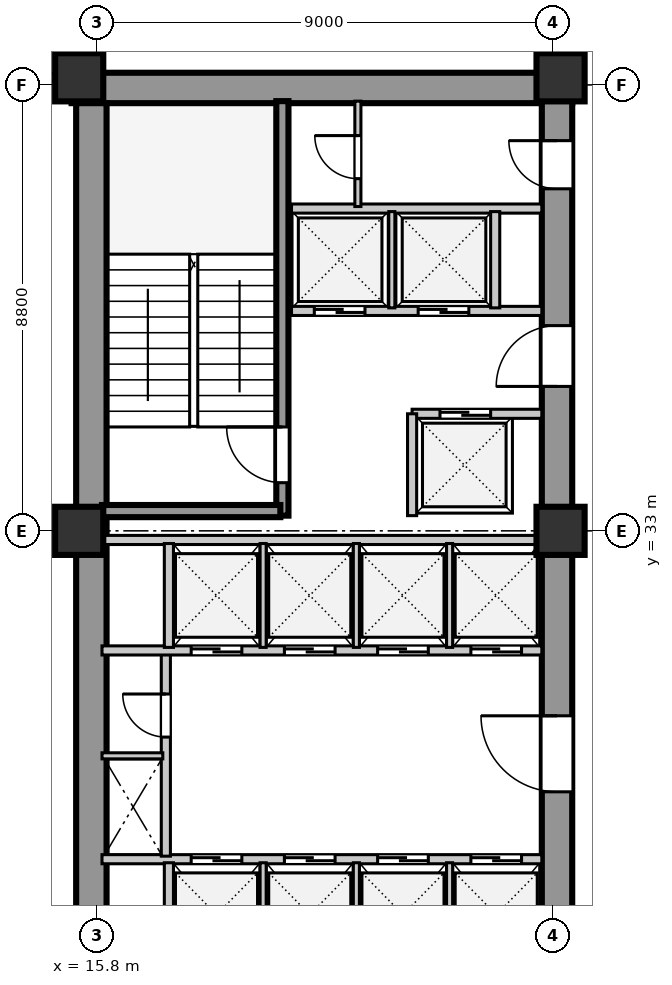
"""IFC4 building model, lengths in metres.
Left out: names, types, materials, properties, quantities, classifications, styles, units other than length and angle.
Written with IfcOpenShell. Run it as: python <this file> out.ifc"""

import sys

from ifc_helpers import new_model, si_unit, direction, frame, frame_2d, origin, origin_2d, place, context, subcontext, project, spatial, rectangle, extrude, element, fill, save


model = new_model("IFC4")
c1 = context("Model", 3, precision=1e-05, world=origin(), true_north=direction((0.0, 1.0)))
c2 = subcontext(c1, "Body", "Model", "MODEL_VIEW")
j1 = project(units=[si_unit("LENGTHUNIT", "METRE"), si_unit("PLANEANGLEUNIT", "RADIAN")], contexts=[c1])
p1 = place(None, origin())
s1 = spatial("IfcSite", under=j1, at=p1, CompositionType="ELEMENT")
p2 = place(p1, origin())
s2 = spatial("IfcBuilding", under=s1, at=p2, CompositionType="ELEMENT")
p3 = place(p2, frame((0.0, 0.0, 12.5)))
s3 = spatial("IfcBuildingStorey", under=s2, at=p3, CompositionType="ELEMENT", Elevation=12.5)
p4 = place(p3, frame((15.3, 41.74, 0.0), z_axis=(0.0, 0.0, 1.0), x_axis=(1.0, 0.0, 0.0)))
e1 = element("IfcWall", 1, at=p4, inside=s3, PredefinedType="SHEAR", context=c2, shape_type="SweptSolid", body=[
    extrude(rectangle(XDim=9.88, YDim=0.6, at=frame_2d((4.94, 0.0))), origin(), (0.0, 0.0, 1.0), 4.22),
])
p5 = place(p3, frame((15.69, 15.81, 0.0), z_axis=(0.0, 0.0, 1.0), x_axis=(0.0, 1.0, 0.0)))
e2 = element("IfcWall", 2, at=p5, inside=s3, PredefinedType="SHEAR", context=c2, shape_type="SweptSolid", body=[
    extrude(rectangle(XDim=25.63, YDim=0.6, at=frame_2d((12.815, 0.0))), origin(), (0.0, 0.0, 1.0), 4.22),
])
p6 = place(p3, frame((24.88, 15.74, 0.0), z_axis=(0.0, 0.0, 1.0), x_axis=(0.0, 1.0, 0.0)))
e3 = element("IfcWall", 3, at=p6, inside=s3, PredefinedType="SHEAR", context=c2, shape_type="SweptSolid", body=[
    extrude(rectangle(XDim=25.76, YDim=0.6, at=frame_2d((12.88, 0.0))), origin(), (0.0, 0.0, 1.0), 4.22),
])
p7 = place(p6, frame((1.61, 0.0, 0.0)))
e4 = element("IfcOpeningElement", 4, at=p7, cuts=e3, PredefinedType="OPENING", context=c2, shape_type="SweptSolid", body=[
    extrude(rectangle(XDim=1.2, YDim=2.1, at=frame_2d((0.6, 1.05))), frame((0.0, 0.31, 0.0), z_axis=(0.0, -1.0, 0.0), x_axis=(1.0, 0.0, 0.0)), (0.0, 0.0, 1.0), 0.62),
])
p8 = place(p6, frame((6.78, 0.0, 0.0)))
e5 = element("IfcOpeningElement", 5, at=p8, cuts=e3, PredefinedType="OPENING", context=c2, shape_type="SweptSolid", body=[
    extrude(rectangle(XDim=0.85, YDim=2.06, at=frame_2d((0.425, 1.03))), frame((0.0, 0.31, 0.0), z_axis=(0.0, -1.0, 0.0), x_axis=(1.0, 0.0, 0.0)), (0.0, 0.0, 1.0), 0.62),
])
p9 = place(p6, frame((12.11, 0.0, 0.0)))
e6 = element("IfcOpeningElement", 6, at=p9, cuts=e3, PredefinedType="OPENING", context=c2, shape_type="SweptSolid", body=[
    extrude(rectangle(XDim=1.5, YDim=2.12, at=frame_2d((0.75, 1.06))), frame((0.0, 0.31, 0.0), z_axis=(0.0, -1.0, 0.0), x_axis=(1.0, 0.0, 0.0)), (0.0, 0.0, 1.0), 0.62),
])
p10 = place(p6, frame((20.11, 0.0, 0.0)))
e7 = element("IfcOpeningElement", 7, at=p10, cuts=e3, PredefinedType="OPENING", context=c2, shape_type="SweptSolid", body=[
    extrude(rectangle(XDim=1.2, YDim=2.12, at=frame_2d((0.6, 1.06))), frame((0.0, 0.31, 0.0), z_axis=(0.0, -1.0, 0.0), x_axis=(1.0, 0.0, 0.0)), (0.0, 0.0, 1.0), 0.62),
])
p11 = place(p6, frame((24.01, 0.0, 0.0)))
e8 = element("IfcOpeningElement", 8, at=p11, cuts=e3, PredefinedType="OPENING", context=c2, shape_type="SweptSolid", body=[
    extrude(rectangle(XDim=0.95, YDim=2.1, at=frame_2d((0.475, 1.05))), frame((0.0, 0.31, 0.0), z_axis=(0.0, -1.0, 0.0), x_axis=(1.0, 0.0, 0.0)), (0.0, 0.0, 1.0), 0.62),
])
for number, where, z_axis, x_axis in (
    (9, (15.45, 33.0, 0.0), (0.0, 0.0, 1.0), (1.0, 0.0, 0.0)),
    (10, (15.45, 41.95, 0.0), (0.0, 0.0, 1.0), (1.0, 0.0, 0.0)),
    (11, (24.95, 33.0, 0.0), (0.0, 0.0, 1.0), (1.0, 0.0, 0.0)),
    (12, (24.95, 41.95, 0.0), (0.0, 0.0, 1.0), (1.0, 0.0, 0.0)),
):
    element("IfcColumn", number, at=place(p3, frame(where, z_axis=z_axis, x_axis=x_axis)), inside=s3, PredefinedType="COLUMN", context=c2, shape_type="SweptSolid", body=[
        extrude(rectangle(XDim=0.95, YDim=0.95, at=origin_2d()), origin(), (0.0, 0.0, 1.0), 4.22),
    ])
p12 = place(p3, frame((15.9, 26.52, 0.0), z_axis=(0.0, 0.0, 1.0), x_axis=(1.0, 0.0, 0.0)))
e13 = element("IfcWall", 13, at=p12, inside=s3, PredefinedType="SOLIDWALL", context=c2, shape_type="SweptSolid", body=[
    extrude(rectangle(XDim=8.68, YDim=0.18, at=frame_2d((4.34, 0.0))), origin(), (0.0, 0.0, 1.0), 4.22),
])
p13 = place(p12, frame((1.76, 0.0, 0.0)))
e14 = element("IfcOpeningElement", 14, at=p13, cuts=e13, PredefinedType="OPENING", context=c2, shape_type="SweptSolid", body=[
    extrude(rectangle(XDim=1.0, YDim=2.1, at=frame_2d((0.5, 1.05))), frame((0.0, 0.1, 0.0), z_axis=(0.0, -1.0, 0.0), x_axis=(1.0, 0.0, 0.0)), (0.0, 0.0, 1.0), 0.2),
])
p14 = place(p12, frame((3.6, 0.0, 0.0)))
e15 = element("IfcOpeningElement", 15, at=p14, cuts=e13, PredefinedType="OPENING", context=c2, shape_type="SweptSolid", body=[
    extrude(rectangle(XDim=1.0, YDim=2.1, at=frame_2d((0.5, 1.05))), frame((0.0, 0.1, 0.0), z_axis=(0.0, -1.0, 0.0), x_axis=(1.0, 0.0, 0.0)), (0.0, 0.0, 1.0), 0.2),
])
p15 = place(p12, frame((5.44, 0.0, 0.0)))
e16 = element("IfcOpeningElement", 16, at=p15, cuts=e13, PredefinedType="OPENING", context=c2, shape_type="SweptSolid", body=[
    extrude(rectangle(XDim=1.0, YDim=2.1, at=frame_2d((0.5, 1.05))), frame((0.0, 0.1, 0.0), z_axis=(0.0, -1.0, 0.0), x_axis=(1.0, 0.0, 0.0)), (0.0, 0.0, 1.0), 0.2),
])
p16 = place(p12, frame((7.28, 0.0, 0.0)))
e17 = element("IfcOpeningElement", 17, at=p16, cuts=e13, PredefinedType="OPENING", context=c2, shape_type="SweptSolid", body=[
    extrude(rectangle(XDim=1.0, YDim=2.1, at=frame_2d((0.5, 1.05))), frame((0.0, 0.1, 0.0), z_axis=(0.0, -1.0, 0.0), x_axis=(1.0, 0.0, 0.0)), (0.0, 0.0, 1.0), 0.2),
])
p17 = place(p3, frame((17.22, 24.4, 0.0), z_axis=(0.0, 0.0, 1.0), x_axis=(0.0, 1.0, 0.0)))
e18 = element("IfcWall", 18, at=p17, inside=s3, PredefinedType="SOLIDWALL", context=c2, shape_type="SweptSolid", body=[
    extrude(rectangle(XDim=2.05, YDim=0.18, at=frame_2d((1.025, 0.0))), origin(), (0.0, 0.0, 1.0), 4.22),
])
for number, where, z_axis, x_axis in (
    (19, (19.08, 24.4, 0.0), (0.0, 0.0, 1.0), (0.0, 1.0, 0.0)),
    (20, (20.92, 24.4, 0.0), (0.0, 0.0, 1.0), (0.0, 1.0, 0.0)),
    (21, (22.76, 24.4, 0.0), (0.0, 0.0, 1.0), (0.0, 1.0, 0.0)),
):
    element("IfcWall", number, at=place(p3, frame(where, z_axis=z_axis, x_axis=x_axis)), inside=s3, PredefinedType="PARTITIONING", context=c2, shape_type="SweptSolid", body=[
        extrude(rectangle(XDim=2.05, YDim=0.12, at=frame_2d((1.025, 0.0))), origin(), (0.0, 0.0, 1.0), 4.22),
    ])
p18 = place(p3, frame((17.16, 26.58, 0.0), z_axis=(0.0, 0.0, 1.0), x_axis=(0.0, 1.0, 0.0)))
e22 = element("IfcWall", 22, at=p18, inside=s3, PredefinedType="SOLIDWALL", context=c2, shape_type="SweptSolid", body=[
    extrude(rectangle(XDim=4.02, YDim=0.18, at=frame_2d((2.01, 0.0))), origin(), (0.0, 0.0, 1.0), 4.22),
])
p19 = place(p18, frame((2.35, 0.0, 0.0)))
e23 = element("IfcOpeningElement", 23, at=p19, cuts=e22, PredefinedType="OPENING", context=c2, shape_type="SweptSolid", body=[
    extrude(rectangle(XDim=0.85, YDim=2.06, at=frame_2d((0.425, 1.03))), frame((0.0, 0.1, 0.0), z_axis=(0.0, -1.0, 0.0), x_axis=(1.0, 0.0, 0.0)), (0.0, 0.0, 1.0), 0.2),
])
p20 = place(p3, frame((15.9, 28.56, 0.0), z_axis=(0.0, 0.0, 1.0), x_axis=(1.0, 0.0, 0.0)))
e24 = element("IfcWall", 24, at=p20, inside=s3, PredefinedType="PARTITIONING", context=c2, shape_type="SweptSolid", body=[
    extrude(rectangle(XDim=1.2, YDim=0.12, at=frame_2d((0.6, 0.0))), origin(), (0.0, 0.0, 1.0), 4.22),
])
p21 = place(p3, frame((15.9, 30.64, 0.0), z_axis=(0.0, 0.0, 1.0), x_axis=(1.0, 0.0, 0.0)))
e25 = element("IfcWall", 25, at=p21, inside=s3, PredefinedType="SOLIDWALL", context=c2, shape_type="SweptSolid", body=[
    extrude(rectangle(XDim=8.68, YDim=0.18, at=frame_2d((4.34, 0.0))), origin(), (0.0, 0.0, 1.0), 4.22),
])
p22 = place(p21, frame((1.76, 0.0, 0.0)))
e26 = element("IfcOpeningElement", 26, at=p22, cuts=e25, PredefinedType="OPENING", context=c2, shape_type="SweptSolid", body=[
    extrude(rectangle(XDim=1.0, YDim=2.1, at=frame_2d((0.5, 1.05))), frame((0.0, 0.1, 0.0), z_axis=(0.0, -1.0, 0.0), x_axis=(1.0, 0.0, 0.0)), (0.0, 0.0, 1.0), 0.2),
])
p23 = place(p21, frame((3.6, 0.0, 0.0)))
e27 = element("IfcOpeningElement", 27, at=p23, cuts=e25, PredefinedType="OPENING", context=c2, shape_type="SweptSolid", body=[
    extrude(rectangle(XDim=1.0, YDim=2.1, at=frame_2d((0.5, 1.05))), frame((0.0, 0.1, 0.0), z_axis=(0.0, -1.0, 0.0), x_axis=(1.0, 0.0, 0.0)), (0.0, 0.0, 1.0), 0.2),
])
p24 = place(p21, frame((5.44, 0.0, 0.0)))
e28 = element("IfcOpeningElement", 28, at=p24, cuts=e25, PredefinedType="OPENING", context=c2, shape_type="SweptSolid", body=[
    extrude(rectangle(XDim=1.0, YDim=2.1, at=frame_2d((0.5, 1.05))), frame((0.0, 0.1, 0.0), z_axis=(0.0, -1.0, 0.0), x_axis=(1.0, 0.0, 0.0)), (0.0, 0.0, 1.0), 0.2),
])
p25 = place(p21, frame((7.28, 0.0, 0.0)))
e29 = element("IfcOpeningElement", 29, at=p25, cuts=e25, PredefinedType="OPENING", context=c2, shape_type="SweptSolid", body=[
    extrude(rectangle(XDim=1.0, YDim=2.1, at=frame_2d((0.5, 1.05))), frame((0.0, 0.1, 0.0), z_axis=(0.0, -1.0, 0.0), x_axis=(1.0, 0.0, 0.0)), (0.0, 0.0, 1.0), 0.2),
])
p26 = place(p3, frame((15.9, 32.82, 0.0), z_axis=(0.0, 0.0, 1.0), x_axis=(1.0, 0.0, 0.0)))
e30 = element("IfcWall", 30, at=p26, inside=s3, PredefinedType="SOLIDWALL", context=c2, shape_type="SweptSolid", body=[
    extrude(rectangle(XDim=8.68, YDim=0.18, at=frame_2d((4.34, 0.0))), origin(), (0.0, 0.0, 1.0), 3.42),
])
p27 = place(p3, frame((17.22, 30.7, 0.0), z_axis=(0.0, 0.0, 1.0), x_axis=(0.0, 1.0, 0.0)))
e31 = element("IfcWall", 31, at=p27, inside=s3, PredefinedType="SOLIDWALL", context=c2, shape_type="SweptSolid", body=[
    extrude(rectangle(XDim=2.05, YDim=0.18, at=frame_2d((1.025, 0.0))), origin(), (0.0, 0.0, 1.0), 4.22),
])
for number, where, z_axis, x_axis in (
    (32, (19.08, 30.7, 0.0), (0.0, 0.0, 1.0), (0.0, 1.0, 0.0)),
    (33, (20.92, 30.7, 0.0), (0.0, 0.0, 1.0), (0.0, 1.0, 0.0)),
    (34, (22.76, 30.7, 0.0), (0.0, 0.0, 1.0), (0.0, 1.0, 0.0)),
):
    element("IfcWall", number, at=place(p3, frame(where, z_axis=z_axis, x_axis=x_axis)), inside=s3, PredefinedType="PARTITIONING", context=c2, shape_type="SweptSolid", body=[
        extrude(rectangle(XDim=2.05, YDim=0.12, at=frame_2d((1.025, 0.0))), origin(), (0.0, 0.0, 1.0), 4.22),
    ])
p28 = place(p3, frame((19.46, 33.3, 0.0), z_axis=(0.0, 0.0, 1.0), x_axis=(0.0, 1.0, 0.0)))
e35 = element("IfcWall", 35, at=p28, inside=s3, PredefinedType="SHEAR", context=c2, shape_type="SweptSolid", body=[
    extrude(rectangle(XDim=8.18, YDim=0.24, at=frame_2d((4.09, 0.0))), origin(), (0.0, 0.0, 1.0), 4.5),
])
p29 = place(p28, frame((0.65, 0.0, 0.0)))
e36 = element("IfcOpeningElement", 36, at=p29, cuts=e35, PredefinedType="OPENING", context=c2, shape_type="SweptSolid", body=[
    extrude(rectangle(XDim=1.1, YDim=2.1, at=frame_2d((0.55, 1.05))), frame((0.0, 0.13, 0.0), z_axis=(0.0, -1.0, 0.0), x_axis=(1.0, 0.0, 0.0)), (0.0, 0.0, 1.0), 0.26),
])
p30 = place(p3, frame((15.9, 33.39, 0.0), z_axis=(0.0, 0.0, 1.0), x_axis=(1.0, 0.0, 0.0)))
e37 = element("IfcWall", 37, at=p30, inside=s3, PredefinedType="SHEAR", context=c2, shape_type="SweptSolid", body=[
    extrude(rectangle(XDim=3.52, YDim=0.24, at=frame_2d((1.76, 0.0))), origin(), (0.0, 0.0, 1.0), 4.5),
])
p31 = place(p3, frame((22.02, 35.31, 0.0), z_axis=(0.0, 0.0, 1.0), x_axis=(1.0, 0.0, 0.0)))
e38 = element("IfcWall", 38, at=p31, inside=s3, PredefinedType="SOLIDWALL", context=c2, shape_type="SweptSolid", body=[
    extrude(rectangle(XDim=2.56, YDim=0.18, at=frame_2d((1.28, 0.0))), origin(), (0.0, 0.0, 1.0), 4.22),
])
p32 = place(p31, frame((0.55, 0.0, 0.0)))
e39 = element("IfcOpeningElement", 39, at=p32, cuts=e38, PredefinedType="OPENING", context=c2, shape_type="SweptSolid", body=[
    extrude(rectangle(XDim=1.0, YDim=2.1, at=frame_2d((0.5, 1.05))), frame((0.0, 0.1, 0.0), z_axis=(0.0, -1.0, 0.0), x_axis=(1.0, 0.0, 0.0)), (0.0, 0.0, 1.0), 0.2),
])
p33 = place(p3, frame((22.02, 33.3, 0.0), z_axis=(0.0, 0.0, 1.0), x_axis=(0.0, 1.0, 0.0)))
e40 = element("IfcWall", 40, at=p33, inside=s3, PredefinedType="SOLIDWALL", context=c2, shape_type="SweptSolid", body=[
    extrude(rectangle(XDim=2.01, YDim=0.18, at=frame_2d((1.005, 0.0))), origin(), (0.0, 0.0, 1.0), 4.22),
])
p34 = place(p3, frame((19.64, 37.34, 0.0), z_axis=(0.0, 0.0, 1.0), x_axis=(1.0, 0.0, 0.0)))
e41 = element("IfcWall", 41, at=p34, inside=s3, PredefinedType="SOLIDWALL", context=c2, shape_type="SweptSolid", body=[
    extrude(rectangle(XDim=4.94, YDim=0.18, at=frame_2d((2.47, 0.0))), origin(), (0.0, 0.0, 1.0), 4.22),
])
p35 = place(p34, frame((0.45, 0.0, 0.0)))
e42 = element("IfcOpeningElement", 42, at=p35, cuts=e41, PredefinedType="OPENING", context=c2, shape_type="SweptSolid", body=[
    extrude(rectangle(XDim=1.0, YDim=2.1, at=frame_2d((0.5, 1.05))), frame((0.0, 0.1, 0.0), z_axis=(0.0, -1.0, 0.0), x_axis=(1.0, 0.0, 0.0)), (0.0, 0.0, 1.0), 0.2),
])
p36 = place(p34, frame((2.5, 0.0, 0.0)))
e43 = element("IfcOpeningElement", 43, at=p36, cuts=e41, PredefinedType="OPENING", context=c2, shape_type="SweptSolid", body=[
    extrude(rectangle(XDim=1.0, YDim=2.1, at=frame_2d((0.5, 1.05))), frame((0.0, 0.1, 0.0), z_axis=(0.0, -1.0, 0.0), x_axis=(1.0, 0.0, 0.0)), (0.0, 0.0, 1.0), 0.2),
])
p37 = place(p3, frame((19.64, 39.36, 0.0), z_axis=(0.0, 0.0, 1.0), x_axis=(1.0, 0.0, 0.0)))
e44 = element("IfcWall", 44, at=p37, inside=s3, PredefinedType="SOLIDWALL", context=c2, shape_type="SweptSolid", body=[
    extrude(rectangle(XDim=4.94, YDim=0.18, at=frame_2d((2.47, 0.0))), origin(), (0.0, 0.0, 1.0), 4.22),
])
p38 = place(p3, frame((21.62, 37.4, 0.0), z_axis=(0.0, 0.0, 1.0), x_axis=(0.0, 1.0, 0.0)))
e45 = element("IfcWall", 45, at=p38, inside=s3, PredefinedType="PARTITIONING", context=c2, shape_type="SweptSolid", body=[
    extrude(rectangle(XDim=1.9, YDim=0.12, at=frame_2d((0.95, 0.0))), origin(), (0.0, 0.0, 1.0), 4.22),
])
p39 = place(p3, frame((23.66, 37.4, 0.0), z_axis=(0.0, 0.0, 1.0), x_axis=(0.0, 1.0, 0.0)))
e46 = element("IfcWall", 46, at=p39, inside=s3, PredefinedType="SOLIDWALL", context=c2, shape_type="SweptSolid", body=[
    extrude(rectangle(XDim=1.9, YDim=0.18, at=frame_2d((0.95, 0.0))), origin(), (0.0, 0.0, 1.0), 4.22),
])
p40 = place(p3, frame((20.95, 39.4, 0.0), z_axis=(0.0, 0.0, 1.0), x_axis=(0.0, 1.0, 0.0)))
e47 = element("IfcWall", 47, at=p40, inside=s3, PredefinedType="PARTITIONING", context=c2, shape_type="SweptSolid", body=[
    extrude(rectangle(XDim=2.08, YDim=0.12, at=frame_2d((1.04, 0.0))), origin(), (0.0, 0.0, 1.0), 4.22),
])
p41 = place(p40, frame((0.55, 0.0, 0.0)))
e48 = element("IfcOpeningElement", 48, at=p41, cuts=e47, PredefinedType="OPENING", context=c2, shape_type="SweptSolid", body=[
    extrude(rectangle(XDim=0.85, YDim=2.06, at=frame_2d((0.425, 1.03))), frame((0.0, 0.07, 0.0), z_axis=(0.0, -1.0, 0.0), x_axis=(1.0, 0.0, 0.0)), (0.0, 0.0, 1.0), 0.14),
])
p42 = place(p3, frame((6.88, 41.95, 0.0), z_axis=(0.0, 0.0, 1.0), x_axis=(1.0, 0.0, 0.0)))
e49 = element("IfcWall", 49, at=p42, inside=s3, PredefinedType="PARTITIONING", context=c2, shape_type="SweptSolid", body=[
    extrude(rectangle(XDim=8.32, YDim=0.15, at=frame_2d((4.16, 0.0))), origin(), (0.0, 0.0, 1.0), 3.72),
])
p43 = place(p13, origin())
e50 = element("IfcDoor", 50, at=p43, inside=s3, OperationType="DOUBLE_DOOR_SLIDING", PredefinedType="DOOR", context=c2, shape_type="SweptSolid", body=[
    extrude(rectangle(XDim=1.0, YDim=2.1, at=frame_2d((0.5, 1.05))), frame((0.0, 0.025, 0.0), z_axis=(0.0, -1.0, 0.0), x_axis=(1.0, 0.0, 0.0)), (0.0, 0.0, 1.0), 0.05),
])
fill(e14, e50)
p44 = place(p14, origin())
e51 = element("IfcDoor", 51, at=p44, inside=s3, OperationType="DOUBLE_DOOR_SLIDING", PredefinedType="DOOR", context=c2, shape_type="SweptSolid", body=[
    extrude(rectangle(XDim=1.0, YDim=2.1, at=frame_2d((0.5, 1.05))), frame((0.0, 0.025, 0.0), z_axis=(0.0, -1.0, 0.0), x_axis=(1.0, 0.0, 0.0)), (0.0, 0.0, 1.0), 0.05),
])
fill(e15, e51)
p45 = place(p15, origin())
e52 = element("IfcDoor", 52, at=p45, inside=s3, OperationType="DOUBLE_DOOR_SLIDING", PredefinedType="DOOR", context=c2, shape_type="SweptSolid", body=[
    extrude(rectangle(XDim=1.0, YDim=2.1, at=frame_2d((0.5, 1.05))), frame((0.0, 0.025, 0.0), z_axis=(0.0, -1.0, 0.0), x_axis=(1.0, 0.0, 0.0)), (0.0, 0.0, 1.0), 0.05),
])
fill(e16, e52)
p46 = place(p16, origin())
e53 = element("IfcDoor", 53, at=p46, inside=s3, OperationType="DOUBLE_DOOR_SLIDING", PredefinedType="DOOR", context=c2, shape_type="SweptSolid", body=[
    extrude(rectangle(XDim=1.0, YDim=2.1, at=frame_2d((0.5, 1.05))), frame((0.0, 0.025, 0.0), z_axis=(0.0, -1.0, 0.0), x_axis=(1.0, 0.0, 0.0)), (0.0, 0.0, 1.0), 0.05),
])
fill(e17, e53)
p47 = place(p19, origin())
e54 = element("IfcDoor", 54, at=p47, inside=s3, OperationType="SINGLE_SWING_RIGHT", PredefinedType="DOOR", context=c2, shape_type="SweptSolid", body=[
    extrude(rectangle(XDim=0.85, YDim=2.06, at=frame_2d((0.425, 1.03))), frame((0.0, 0.025, 0.0), z_axis=(0.0, -1.0, 0.0), x_axis=(1.0, 0.0, 0.0)), (0.0, 0.0, 1.0), 0.05),
])
fill(e23, e54)
p48 = place(p9, frame((1.5, 0.0, 0.0), z_axis=(0.0, 0.0, 1.0), x_axis=(-1.0, 0.0, 0.0)))
e55 = element("IfcDoor", 55, at=p48, inside=s3, OperationType="SINGLE_SWING_LEFT", PredefinedType="DOOR", context=c2, shape_type="SweptSolid", body=[
    extrude(rectangle(XDim=1.5, YDim=2.12, at=frame_2d((0.75, 1.06))), frame((0.0, 0.025, 0.0), z_axis=(0.0, -1.0, 0.0), x_axis=(1.0, 0.0, 0.0)), (0.0, 0.0, 1.0), 0.05),
])
fill(e6, e55)
p49 = place(p22, frame((1.0, 0.0, 0.0), z_axis=(0.0, 0.0, 1.0), x_axis=(-1.0, 0.0, 0.0)))
e56 = element("IfcDoor", 56, at=p49, inside=s3, OperationType="DOUBLE_DOOR_SLIDING", PredefinedType="DOOR", context=c2, shape_type="SweptSolid", body=[
    extrude(rectangle(XDim=1.0, YDim=2.1, at=frame_2d((0.5, 1.05))), frame((0.0, 0.025, 0.0), z_axis=(0.0, -1.0, 0.0), x_axis=(1.0, 0.0, 0.0)), (0.0, 0.0, 1.0), 0.05),
])
fill(e26, e56)
p50 = place(p23, frame((1.0, 0.0, 0.0), z_axis=(0.0, 0.0, 1.0), x_axis=(-1.0, 0.0, 0.0)))
e57 = element("IfcDoor", 57, at=p50, inside=s3, OperationType="DOUBLE_DOOR_SLIDING", PredefinedType="DOOR", context=c2, shape_type="SweptSolid", body=[
    extrude(rectangle(XDim=1.0, YDim=2.1, at=frame_2d((0.5, 1.05))), frame((0.0, 0.025, 0.0), z_axis=(0.0, -1.0, 0.0), x_axis=(1.0, 0.0, 0.0)), (0.0, 0.0, 1.0), 0.05),
])
fill(e27, e57)
p51 = place(p24, frame((1.0, 0.0, 0.0), z_axis=(0.0, 0.0, 1.0), x_axis=(-1.0, 0.0, 0.0)))
e58 = element("IfcDoor", 58, at=p51, inside=s3, OperationType="DOUBLE_DOOR_SLIDING", PredefinedType="DOOR", context=c2, shape_type="SweptSolid", body=[
    extrude(rectangle(XDim=1.0, YDim=2.1, at=frame_2d((0.5, 1.05))), frame((0.0, 0.025, 0.0), z_axis=(0.0, -1.0, 0.0), x_axis=(1.0, 0.0, 0.0)), (0.0, 0.0, 1.0), 0.05),
])
fill(e28, e58)
p52 = place(p25, frame((1.0, 0.0, 0.0), z_axis=(0.0, 0.0, 1.0), x_axis=(-1.0, 0.0, 0.0)))
e59 = element("IfcDoor", 59, at=p52, inside=s3, OperationType="DOUBLE_DOOR_SLIDING", PredefinedType="DOOR", context=c2, shape_type="SweptSolid", body=[
    extrude(rectangle(XDim=1.0, YDim=2.1, at=frame_2d((0.5, 1.05))), frame((0.0, 0.025, 0.0), z_axis=(0.0, -1.0, 0.0), x_axis=(1.0, 0.0, 0.0)), (0.0, 0.0, 1.0), 0.05),
])
fill(e29, e59)
p53 = place(p29, origin())
e60 = element("IfcDoor", 60, at=p53, inside=s3, OperationType="SINGLE_SWING_RIGHT", PredefinedType="DOOR", context=c2, shape_type="SweptSolid", body=[
    extrude(rectangle(XDim=1.1, YDim=2.1, at=frame_2d((0.55, 1.05))), frame((0.0, 0.025, 0.0), z_axis=(0.0, -1.0, 0.0), x_axis=(1.0, 0.0, 0.0)), (0.0, 0.0, 1.0), 0.05),
])
fill(e36, e60)
p54 = place(p10, frame((1.2, 0.0, 0.0), z_axis=(0.0, 0.0, 1.0), x_axis=(-1.0, 0.0, 0.0)))
e61 = element("IfcDoor", 61, at=p54, inside=s3, OperationType="SINGLE_SWING_RIGHT", PredefinedType="DOOR", context=c2, shape_type="SweptSolid", body=[
    extrude(rectangle(XDim=1.2, YDim=2.12, at=frame_2d((0.6, 1.06))), frame((0.0, 0.025, 0.0), z_axis=(0.0, -1.0, 0.0), x_axis=(1.0, 0.0, 0.0)), (0.0, 0.0, 1.0), 0.05),
])
fill(e7, e61)
p55 = place(p35, frame((1.0, 0.0, 0.0), z_axis=(0.0, 0.0, 1.0), x_axis=(-1.0, 0.0, 0.0)))
e62 = element("IfcDoor", 62, at=p55, inside=s3, OperationType="DOUBLE_DOOR_SLIDING", PredefinedType="DOOR", context=c2, shape_type="SweptSolid", body=[
    extrude(rectangle(XDim=1.0, YDim=2.1, at=frame_2d((0.5, 1.05))), frame((0.0, 0.025, 0.0), z_axis=(0.0, -1.0, 0.0), x_axis=(1.0, 0.0, 0.0)), (0.0, 0.0, 1.0), 0.05),
])
fill(e42, e62)
p56 = place(p36, frame((1.0, 0.0, 0.0), z_axis=(0.0, 0.0, 1.0), x_axis=(-1.0, 0.0, 0.0)))
e63 = element("IfcDoor", 63, at=p56, inside=s3, OperationType="DOUBLE_DOOR_SLIDING", PredefinedType="DOOR", context=c2, shape_type="SweptSolid", body=[
    extrude(rectangle(XDim=1.0, YDim=2.1, at=frame_2d((0.5, 1.05))), frame((0.0, 0.025, 0.0), z_axis=(0.0, -1.0, 0.0), x_axis=(1.0, 0.0, 0.0)), (0.0, 0.0, 1.0), 0.05),
])
fill(e43, e63)
p57 = place(p32, origin())
e64 = element("IfcDoor", 64, at=p57, inside=s3, OperationType="DOUBLE_DOOR_SLIDING", PredefinedType="DOOR", context=c2, shape_type="SweptSolid", body=[
    extrude(rectangle(XDim=1.0, YDim=2.1, at=frame_2d((0.5, 1.05))), frame((0.0, 0.025, 0.0), z_axis=(0.0, -1.0, 0.0), x_axis=(1.0, 0.0, 0.0)), (0.0, 0.0, 1.0), 0.05),
])
fill(e39, e64)
p58 = place(p41, origin())
e65 = element("IfcDoor", 65, at=p58, inside=s3, OperationType="SINGLE_SWING_RIGHT", PredefinedType="DOOR", context=c2, shape_type="SweptSolid", body=[
    extrude(rectangle(XDim=0.85, YDim=2.06, at=frame_2d((0.425, 1.03))), frame((0.0, 0.025, 0.0), z_axis=(0.0, -1.0, 0.0), x_axis=(1.0, 0.0, 0.0)), (0.0, 0.0, 1.0), 0.05),
])
fill(e48, e65)
p59 = place(p11, frame((0.95, 0.0, 0.0), z_axis=(0.0, 0.0, 1.0), x_axis=(-1.0, 0.0, 0.0)))
e66 = element("IfcDoor", 66, at=p59, inside=s3, OperationType="SINGLE_SWING_LEFT", PredefinedType="DOOR", context=c2, shape_type="SweptSolid", body=[
    extrude(rectangle(XDim=0.95, YDim=2.1, at=frame_2d((0.475, 1.05))), frame((0.0, 0.025, 0.0), z_axis=(0.0, -1.0, 0.0), x_axis=(1.0, 0.0, 0.0)), (0.0, 0.0, 1.0), 0.05),
])
fill(e8, e66)
save(model, sys.argv[1])
